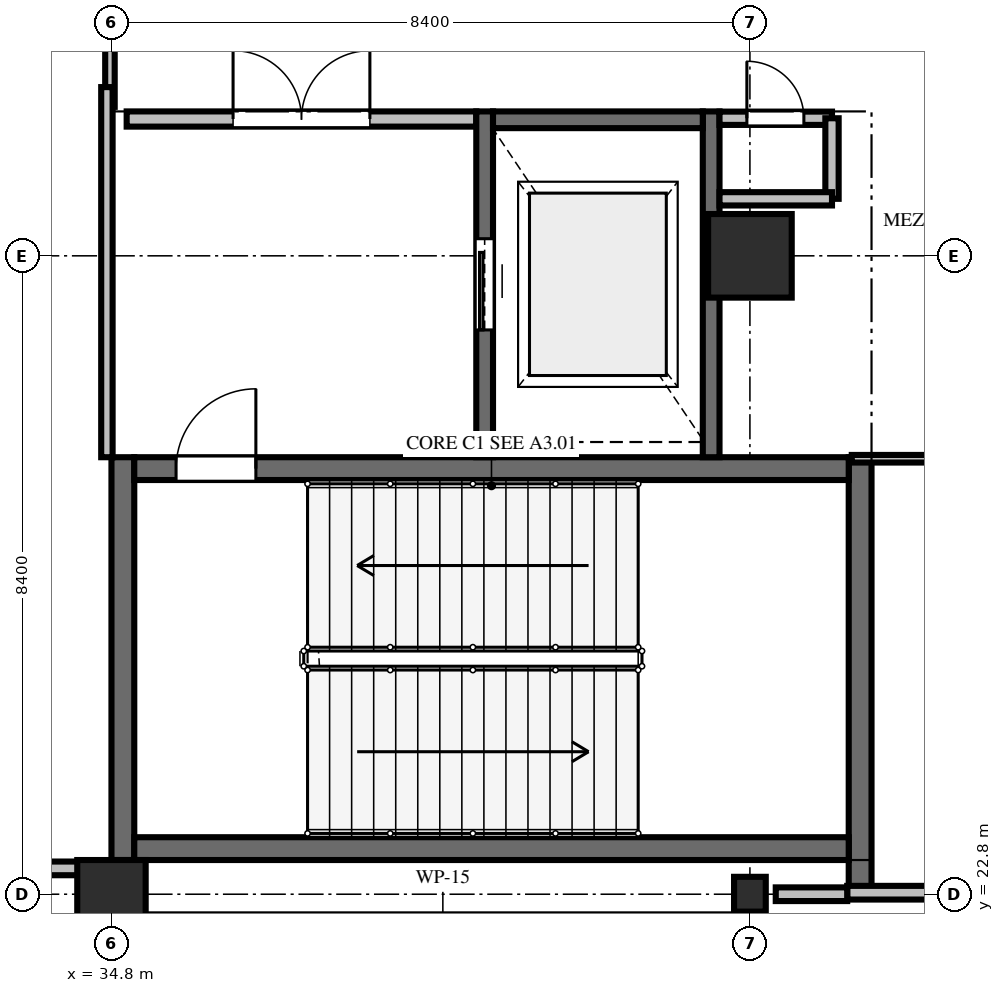
"""IFC4 building model, lengths in metres.
Left out: names, types, materials, properties, quantities, classifications, styles, units other than length and angle.
Written with IfcOpenShell. Run it as: python <this file> out.ifc"""

import sys

from ifc_helpers import new_model, si_unit, direction, frame, frame_2d, origin, origin_2d, place, context, subcontext, project, spatial, rectangle, hollow_rectangle, i_section, extrude, element, fill, save


model = new_model("IFC4")
c1 = context("Model", 3, precision=1e-05, world=origin(), true_north=direction((0.0, 1.0)))
c2 = subcontext(c1, "Body", "Model", "MODEL_VIEW")
j1 = project(units=[si_unit("LENGTHUNIT", "METRE"), si_unit("PLANEANGLEUNIT", "RADIAN")], contexts=[c1])
p1 = place(None, origin())
s1 = spatial("IfcSite", under=j1, at=p1, CompositionType="ELEMENT")
p2 = place(p1, origin())
s2 = spatial("IfcBuilding", under=s1, at=p2, CompositionType="ELEMENT")
p3 = place(p2, frame((0.0, 0.0, 5.4)))
s3 = spatial("IfcBuildingStorey", under=s2, at=p3, CompositionType="ELEMENT", Elevation=5.4)
p4 = place(p3, frame((34.8, 22.8, 0.0), z_axis=(0.0, 0.0, 1.0), x_axis=(1.0, 0.0, 0.0)))
e1 = element("IfcColumn", 1, at=p4, inside=s3, PredefinedType="COLUMN", context=c2, shape_type="SweptSolid", body=[
    extrude(hollow_rectangle(XDim=0.9, YDim=0.9, WallThickness=0.036, InnerFilletRadius=0.036, OuterFilletRadius=0.072, at=origin_2d()), origin(), (0.0, 0.0, 1.0), 5.4),
])
p5 = place(p3, frame((43.2, 22.8, 0.0), z_axis=(0.0, 0.0, 1.0), x_axis=(1.0, 0.0, 0.0)))
e2 = element("IfcColumn", 2, at=p5, inside=s3, PredefinedType="COLUMN", context=c2, shape_type="SweptSolid", body=[
    extrude(i_section(OverallWidth=0.417, OverallDepth=0.458, WebThickness=0.03, FlangeThickness=0.04, FilletRadius=0.022, at=origin_2d()), origin(), (0.0, 0.0, 1.0), 5.4),
])
p6 = place(p3, frame((43.2, 31.2, 0.0), z_axis=(0.0, 0.0, 1.0), x_axis=(1.0, 0.0, 0.0)))
e3 = element("IfcColumn", 3, at=p6, inside=s3, PredefinedType="COLUMN", context=c2, shape_type="SweptSolid", body=[
    extrude(rectangle(XDim=1.1, YDim=1.1, at=origin_2d()), origin(), (0.0, 0.0, 1.0), 5.4),
])
p7 = place(p3, frame((34.95, 23.25, 0.0), z_axis=(0.0, 0.0, 1.0), x_axis=(0.0, 1.0, 0.0)))
e4 = element("IfcWall", 4, at=p7, inside=s3, PredefinedType="SHEAR", context=c2, shape_type="SweptSolid", body=[
    extrude(rectangle(XDim=5.3, YDim=0.3, at=frame_2d((2.65, 0.0))), origin(), (0.0, 0.0, 1.0), 4.98),
])
p8 = place(p3, frame((44.65, 28.55, 0.0), z_axis=(0.0, 0.0, 1.0), x_axis=(0.0, -1.0, 0.0)))
e5 = element("IfcWall", 5, at=p8, inside=s3, PredefinedType="SHEAR", context=c2, shape_type="SweptSolid", body=[
    extrude(rectangle(XDim=5.75, YDim=0.3, at=frame_2d((2.875, 0.0))), origin(), (0.0, 0.0, 1.0), 4.98),
])
p9 = place(p3, frame((44.5, 23.4, 0.0), z_axis=(0.0, 0.0, 1.0), x_axis=(-1.0, 0.0, 0.0)))
e6 = element("IfcWall", 6, at=p9, inside=s3, PredefinedType="SHEAR", context=c2, shape_type="SweptSolid", body=[
    extrude(rectangle(XDim=9.4, YDim=0.3, at=frame_2d((4.7, 0.0))), origin(), (0.0, 0.0, 1.0), 4.98),
])
p10 = place(p3, frame((35.1, 28.4, 0.0), z_axis=(0.0, 0.0, 1.0), x_axis=(1.0, 0.0, 0.0)))
e7 = element("IfcWall", 7, at=p10, inside=s3, PredefinedType="SHEAR", context=c2, shape_type="SweptSolid", body=[
    extrude(rectangle(XDim=9.4, YDim=0.3, at=frame_2d((4.7, 0.0))), origin(), (0.0, 0.0, 1.0), 4.98),
])
p11 = place(p10, frame((0.55, 0.0, 0.0)))
e8 = element("IfcOpeningElement", 8, at=p11, cuts=e7, PredefinedType="OPENING", context=c2, shape_type="SweptSolid", body=[
    extrude(rectangle(XDim=1.05, YDim=2.2, at=frame_2d((0.525, 1.1))), frame((0.0, 0.16, 0.0), z_axis=(0.0, -1.0, 0.0), x_axis=(1.0, 0.0, 0.0)), (0.0, 0.0, 1.0), 0.32),
])
p12 = place(p3, frame((35.0, 33.0, 0.0), z_axis=(0.0, 0.0, 1.0), x_axis=(1.0, 0.0, 0.0)))
e9 = element("IfcWall", 9, at=p12, inside=s3, PredefinedType="SOLIDWALL", context=c2, shape_type="SweptSolid", body=[
    extrude(rectangle(XDim=4.6, YDim=0.2, at=frame_2d((2.3, 0.0))), origin(), (0.0, 0.0, 1.0), 4.98),
])
p13 = place(p12, frame((1.4, 0.0, 0.0)))
e10 = element("IfcOpeningElement", 10, at=p13, cuts=e9, PredefinedType="OPENING", context=c2, shape_type="SweptSolid", body=[
    extrude(rectangle(XDim=1.8, YDim=2.2, at=frame_2d((0.9, 1.1))), frame((0.0, 0.11, 0.0), z_axis=(0.0, -1.0, 0.0), x_axis=(1.0, 0.0, 0.0)), (0.0, 0.0, 1.0), 0.22),
])
p14 = place(p3, frame((39.71, 28.55, 0.0), z_axis=(0.0, 0.0, 1.0), x_axis=(0.0, 1.0, 0.0)))
e11 = element("IfcWall", 11, at=p14, inside=s3, PredefinedType="SOLIDWALL", context=c2, shape_type="SweptSolid", body=[
    extrude(rectangle(XDim=4.55, YDim=0.22, at=frame_2d((2.275, 0.0))), origin(), (0.0, 0.0, 1.0), 4.98),
])
p15 = place(p14, frame((1.675, 0.0, 0.0)))
e12 = element("IfcOpeningElement", 12, at=p15, cuts=e11, PredefinedType="OPENING", context=c2, shape_type="SweptSolid", body=[
    extrude(rectangle(XDim=1.2, YDim=2.2, at=frame_2d((0.6, 1.1))), frame((0.0, 0.12, 0.0), z_axis=(0.0, -1.0, 0.0), x_axis=(1.0, 0.0, 0.0)), (0.0, 0.0, 1.0), 0.24),
])
p16 = place(p3, frame((42.69, 28.55, 0.0), z_axis=(0.0, 0.0, 1.0), x_axis=(0.0, 1.0, 0.0)))
e13 = element("IfcWall", 13, at=p16, inside=s3, PredefinedType="SOLIDWALL", context=c2, shape_type="SweptSolid", body=[
    extrude(rectangle(XDim=4.55, YDim=0.22, at=frame_2d((2.275, 0.0))), origin(), (0.0, 0.0, 1.0), 4.98),
])
p17 = place(p3, frame((39.82, 32.99, 0.0), z_axis=(0.0, 0.0, 1.0), x_axis=(1.0, 0.0, 0.0)))
e14 = element("IfcWall", 14, at=p17, inside=s3, PredefinedType="SOLIDWALL", context=c2, shape_type="SweptSolid", body=[
    extrude(rectangle(XDim=2.76, YDim=0.22, at=frame_2d((1.38, 0.0))), origin(), (0.0, 0.0, 1.0), 4.98),
])
p18 = place(p3, frame((42.8, 33.01, 0.0), z_axis=(0.0, 0.0, 1.0), x_axis=(1.0, 0.0, 0.0)))
e15 = element("IfcWall", 15, at=p18, inside=s3, PredefinedType="PLUMBINGWALL", context=c2, shape_type="SweptSolid", body=[
    extrude(rectangle(XDim=1.48, YDim=0.175, at=frame_2d((0.74, 0.0))), origin(), (0.0, 0.0, 1.0), 4.98),
])
p19 = place(p18, frame((0.36, 0.0, 0.0)))
e16 = element("IfcOpeningElement", 16, at=p19, cuts=e15, PredefinedType="OPENING", context=c2, shape_type="SweptSolid", body=[
    extrude(rectangle(XDim=0.75, YDim=2.05, at=frame_2d((0.375, 1.025))), frame((0.0, 0.097, 0.0), z_axis=(0.0, -1.0, 0.0), x_axis=(1.0, 0.0, 0.0)), (0.0, 0.0, 1.0), 0.195),
])
p20 = place(p3, frame((44.28, 31.95, 0.0), z_axis=(0.0, 0.0, 1.0), x_axis=(0.0, 1.0, 0.0)))
e17 = element("IfcWall", 17, at=p20, inside=s3, PredefinedType="PLUMBINGWALL", context=c2, shape_type="SweptSolid", body=[
    extrude(rectangle(XDim=1.06, YDim=0.175, at=frame_2d((0.53, 0.0))), origin(), (0.0, 0.0, 1.0), 4.98),
])
p21 = place(p3, frame((42.8, 31.95, 0.0), z_axis=(0.0, 0.0, 1.0), x_axis=(1.0, 0.0, 0.0)))
e18 = element("IfcWall", 18, at=p21, inside=s3, PredefinedType="PLUMBINGWALL", context=c2, shape_type="SweptSolid", body=[
    extrude(rectangle(XDim=1.48, YDim=0.175, at=frame_2d((0.74, 0.0))), origin(), (0.0, 0.0, 1.0), 4.98),
])
p22 = place(p3, frame((34.476, 23.14, 0.0), z_axis=(0.0, 0.0, 1.0), x_axis=(-1.0, 0.0, 0.0)))
e19 = element("IfcWall", 19, at=p22, inside=s3, PredefinedType="PARTITIONING", context=c2, shape_type="SweptSolid", body=[
    extrude(rectangle(XDim=6.828, YDim=0.18, at=frame_2d((3.414, 0.0))), origin(), (0.0, 0.0, 1.0), 4.58),
])
p23 = place(p3, frame((34.78, 51.26, 0.0), z_axis=(0.0, 0.0, 1.0), x_axis=(0.0, -1.0, 0.0)))
e20 = element("IfcWall", 20, at=p23, inside=s3, PredefinedType="PARTITIONING", context=c2, shape_type="SweptSolid", body=[
    extrude(rectangle(XDim=18.1, YDim=0.125, at=frame_2d((9.05, 0.0))), origin(), (0.0, 0.0, 1.0), 4.382),
])
p24 = place(p23, frame((8.25, 0.0, 0.0)))
e21 = element("IfcOpeningElement", 21, at=p24, cuts=e20, PredefinedType="OPENING", context=c2, shape_type="SweptSolid", body=[
    extrude(rectangle(XDim=1.6, YDim=2.2, at=frame_2d((0.8, 1.1))), frame((0.0, 0.073, 0.0), z_axis=(0.0, -1.0, 0.0), x_axis=(1.0, 0.0, 0.0)), (0.0, 0.0, 1.0), 0.145),
])
p25 = place(p3, frame((34.74, 33.42, 0.0), z_axis=(0.0, 0.0, 1.0), x_axis=(0.0, -1.0, 0.0)))
e22 = element("IfcWall", 22, at=p25, inside=s3, PredefinedType="PARTITIONING", context=c2, shape_type="SweptSolid", body=[
    extrude(rectangle(XDim=4.87, YDim=0.15, at=frame_2d((2.435, 0.0))), origin(), (0.0, 0.0, 1.0), 4.98),
])
p26 = place(p3, frame((64.0, 22.82, 0.0), z_axis=(0.0, 0.0, 1.0), x_axis=(-1.0, 0.0, 0.0)))
e23 = element("IfcWall", 23, at=p26, inside=s3, PredefinedType="PARTITIONING", context=c2, shape_type="SweptSolid", body=[
    extrude(rectangle(XDim=19.52, YDim=0.18, at=frame_2d((9.76, 0.0))), origin(), (0.0, 0.0, 1.0), 4.12),
])
p27 = place(p26, frame((8.96, 0.0, 0.0)))
e24 = element("IfcOpeningElement", 24, at=p27, cuts=e23, PredefinedType="OPENING", context=c2, shape_type="SweptSolid", body=[
    extrude(rectangle(XDim=1.6, YDim=2.2, at=frame_2d((0.8, 1.1))), frame((0.0, 0.1, 0.0), z_axis=(0.0, -1.0, 0.0), x_axis=(1.0, 0.0, 0.0)), (0.0, 0.0, 1.0), 0.2),
])
p28 = place(p3, frame((44.54, 28.53, 0.0), z_axis=(0.0, 0.0, 1.0), x_axis=(1.0, 0.0, 0.0)))
e25 = element("IfcWall", 25, at=p28, inside=s3, PredefinedType="PARTITIONING", context=c2, shape_type="SweptSolid", body=[
    extrude(rectangle(XDim=19.46, YDim=0.1, at=frame_2d((9.73, 0.0))), origin(), (0.0, 0.0, 1.0), 4.17),
])
p29 = place(p28, frame((8.93, 0.0, 0.0)))
e26 = element("IfcOpeningElement", 26, at=p29, cuts=e25, PredefinedType="OPENING", context=c2, shape_type="SweptSolid", body=[
    extrude(rectangle(XDim=1.6, YDim=2.2, at=frame_2d((0.8, 1.1))), frame((0.0, 0.06, 0.0), z_axis=(0.0, -1.0, 0.0), x_axis=(1.0, 0.0, 0.0)), (0.0, 0.0, 1.0), 0.12),
])
p30 = place(p3, frame((43.54, 22.8, 0.0), z_axis=(0.0, 0.0, 1.0), x_axis=(1.0, 0.0, 0.0)))
e27 = element("IfcWall", 27, at=p30, inside=s3, PredefinedType="PARTITIONING", context=c2, shape_type="SweptSolid", body=[
    extrude(rectangle(XDim=0.94, YDim=0.18, at=frame_2d((0.47, 0.0))), origin(), (0.0, 0.0, 1.0), 4.22),
])
p31 = place(p11, origin())
e28 = element("IfcDoor", 28, at=p31, inside=s3, OperationType="SINGLE_SWING_RIGHT", PredefinedType="DOOR", context=c2, shape_type="SweptSolid", body=[
    extrude(rectangle(XDim=1.05, YDim=2.2, at=frame_2d((0.525, 1.1))), frame((0.0, 0.025, 0.0), z_axis=(0.0, -1.0, 0.0), x_axis=(1.0, 0.0, 0.0)), (0.0, 0.0, 1.0), 0.05),
])
fill(e8, e28)
p32 = place(p13, origin())
e29 = element("IfcDoor", 29, at=p32, inside=s3, OperationType="DOUBLE_DOOR_SINGLE_SWING", PredefinedType="DOOR", context=c2, shape_type="SweptSolid", body=[
    extrude(rectangle(XDim=1.8, YDim=2.2, at=frame_2d((0.9, 1.1))), frame((0.0, 0.025, 0.0), z_axis=(0.0, -1.0, 0.0), x_axis=(1.0, 0.0, 0.0)), (0.0, 0.0, 1.0), 0.05),
])
fill(e10, e29)
p33 = place(p15, origin())
e30 = element("IfcDoor", 30, at=p33, inside=s3, OperationType="SLIDING_TO_LEFT", PredefinedType="DOOR", context=c2, shape_type="SweptSolid", body=[
    extrude(rectangle(XDim=1.2, YDim=2.2, at=frame_2d((0.6, 1.1))), frame((0.0, 0.025, 0.0), z_axis=(0.0, -1.0, 0.0), x_axis=(1.0, 0.0, 0.0)), (0.0, 0.0, 1.0), 0.05),
])
fill(e12, e30)
p34 = place(p19, origin())
e31 = element("IfcDoor", 31, at=p34, inside=s3, OperationType="SINGLE_SWING_LEFT", PredefinedType="DOOR", context=c2, shape_type="SweptSolid", body=[
    extrude(rectangle(XDim=0.75, YDim=2.05, at=frame_2d((0.375, 1.025))), frame((0.0, 0.025, 0.0), z_axis=(0.0, -1.0, 0.0), x_axis=(1.0, 0.0, 0.0)), (0.0, 0.0, 1.0), 0.05),
])
fill(e16, e31)
save(model, sys.argv[1])
